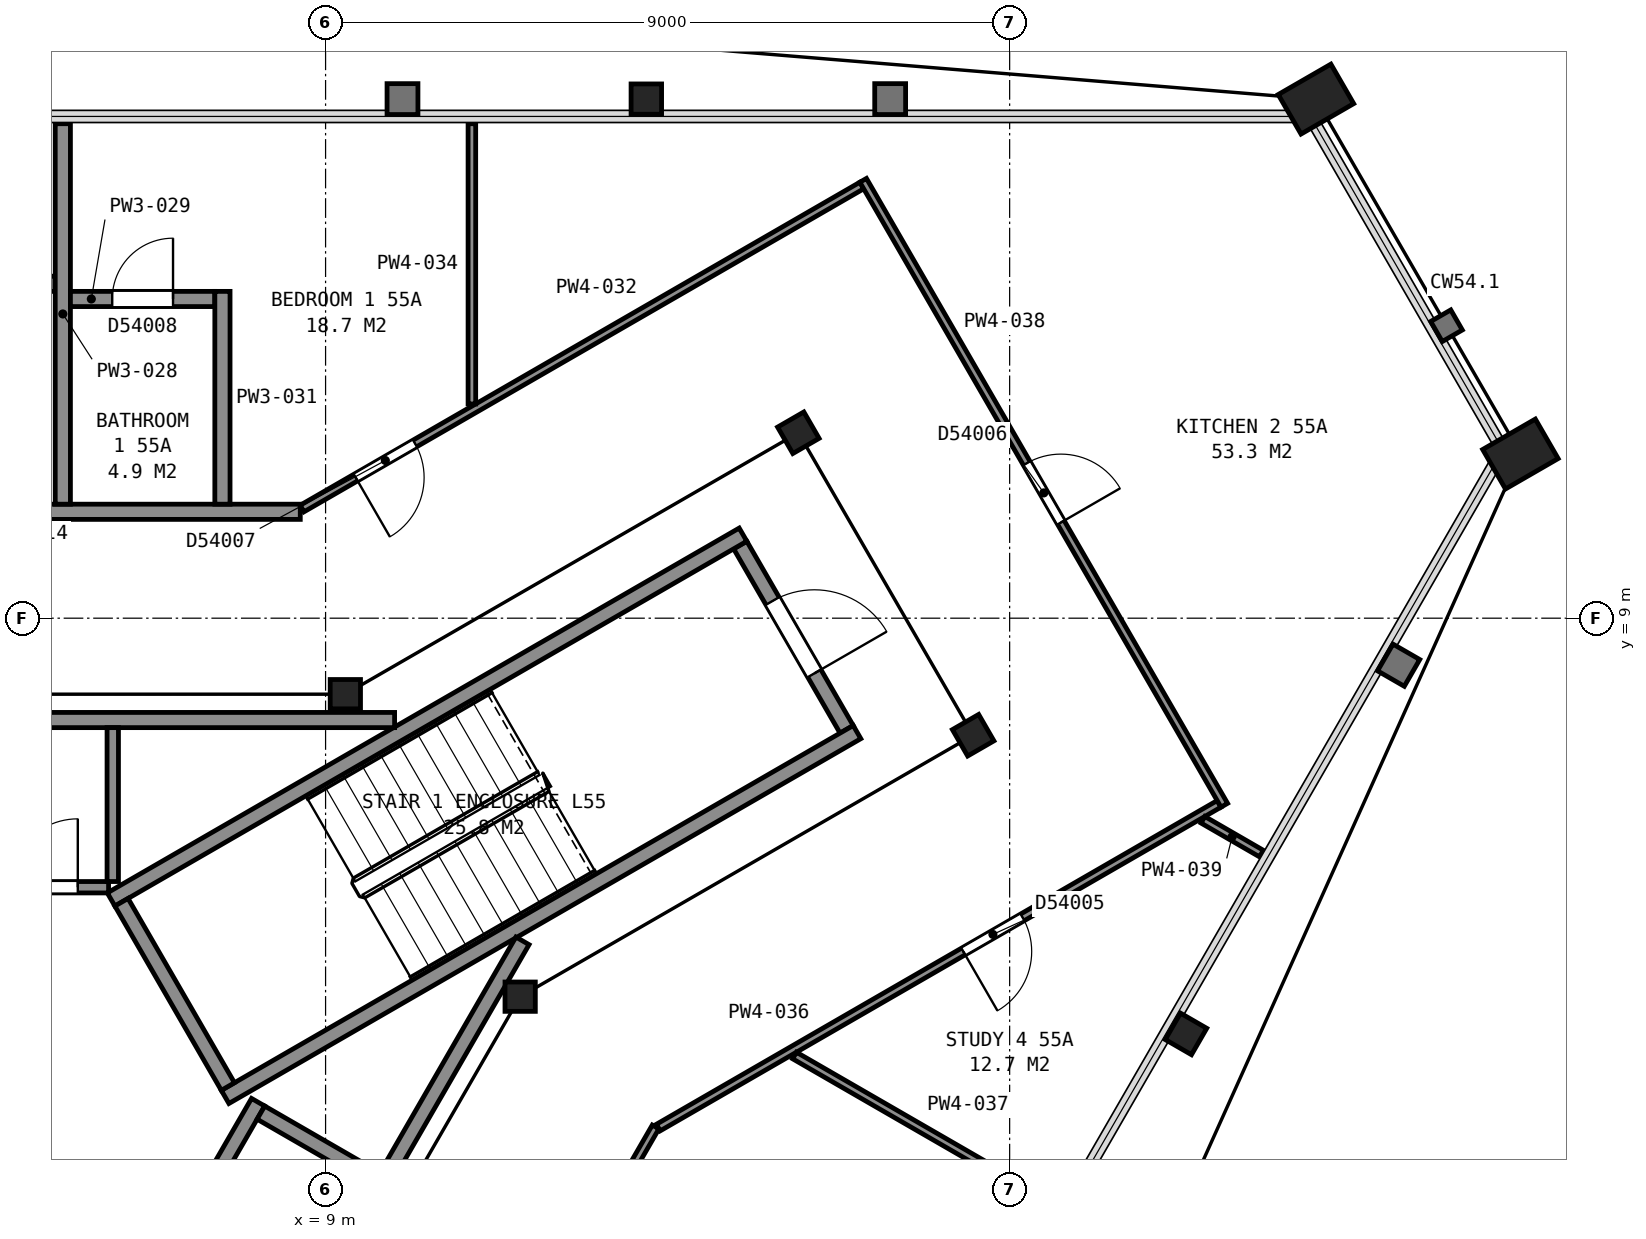
"""IFC4 building model, lengths in metres.
Left out: names, types, materials, properties, quantities, classifications, styles, units other than length and angle.
Written with IfcOpenShell. Run it as: python <this file> out.ifc"""

import sys

from ifc_helpers import new_model, si_unit, direction, frame, frame_2d, origin, origin_2d, place, context, subcontext, project, spatial, rectangle, hollow_rectangle, i_section, extrude, element, fill, save


model = new_model("IFC4")
c1 = context("Model", 3, precision=1e-05, world=origin(), true_north=direction((0.0, 1.0)))
c2 = subcontext(c1, "Body", "Model", "MODEL_VIEW")
j1 = project(units=[si_unit("LENGTHUNIT", "METRE"), si_unit("PLANEANGLEUNIT", "RADIAN")], contexts=[c1])
p1 = place(None, origin())
s1 = spatial("IfcSite", under=j1, at=p1, CompositionType="ELEMENT")
p2 = place(p1, origin())
s2 = spatial("IfcBuilding", under=s1, at=p2, CompositionType="ELEMENT")
p3 = place(p2, frame((0.0, 0.0, 221.2)))
s3 = spatial("IfcBuildingStorey", under=s2, at=p3, CompositionType="ELEMENT", Elevation=221.2)
p4 = place(p3, frame((22.03, 15.83, 0.0), z_axis=(0.0, 0.0, 1.0), x_axis=(0.5, -0.866025403784, 0.0)))
e1 = element("IfcColumn", 1, at=p4, inside=s3, PredefinedType="COLUMN", context=c2, shape_type="SweptSolid", body=[
    extrude(hollow_rectangle(XDim=0.6, YDim=0.8, WallThickness=0.05, at=origin_2d()), origin(), (0.0, 0.0, 1.0), 3.7),
])
for number, where, z_axis, x_axis in (
    (2, (13.22, 15.83, 0.0), (0.0, 0.0, 1.0), (1.0, 0.0, 0.0)),
    (3, (20.32, 3.53, 0.0), (0.0, 0.0, 1.0), (-0.5, -0.866, 0.0)),
):
    element("IfcColumn", number, at=place(p3, frame(where, z_axis=z_axis, x_axis=x_axis)), inside=s3, PredefinedType="COLUMN", context=c2, shape_type="SweptSolid", body=[
        extrude(i_section(OverallWidth=0.401, OverallDepth=0.399, WebThickness=0.025, FlangeThickness=0.04, FilletRadius=0.015, at=origin_2d()), origin(), (0.0, 0.0, 1.0), 3.7),
    ])
p5 = place(p3, frame((24.72, 11.16, 0.0), z_axis=(0.0, 0.0, 1.0), x_axis=(0.5, -0.866025403784, 0.0)))
e4 = element("IfcColumn", 4, at=p5, inside=s3, PredefinedType="COLUMN", context=c2, shape_type="SweptSolid", body=[
    extrude(hollow_rectangle(XDim=0.6, YDim=0.8, WallThickness=0.05, at=origin_2d()), origin(), (0.0, 0.0, 1.0), 3.7),
])
p6 = place(p3, frame((11.56, 4.02, 0.0), z_axis=(0.0, 0.0, 1.0), x_axis=(1.0, 0.0, 0.0)))
e5 = element("IfcColumn", 5, at=p6, inside=s3, PredefinedType="COLUMN", context=c2, shape_type="SweptSolid", body=[
    extrude(i_section(OverallWidth=0.399, OverallDepth=0.386, WebThickness=0.021, FlangeThickness=0.033, FilletRadius=0.015, at=origin_2d()), origin(), (0.0, 0.0, 1.0), 3.7),
])
for number, where, z_axis, x_axis in (
    (6, (17.52, 7.46, 0.0), (0.0, 0.0, 1.0), (0.5, -0.866, 0.0)),
    (7, (15.22, 11.44, 0.0), (0.0, 0.0, 1.0), (0.5, -0.866, 0.0)),
):
    element("IfcColumn", number, at=place(p3, frame(where, z_axis=z_axis, x_axis=x_axis)), inside=s3, PredefinedType="COLUMN", context=c2, shape_type="SweptSolid", body=[
        extrude(i_section(OverallWidth=0.401, OverallDepth=0.399, WebThickness=0.025, FlangeThickness=0.04, FilletRadius=0.015, at=origin_2d()), origin(), (0.0, 0.0, 1.0), 3.7),
    ])
p7 = place(p3, frame((9.26, 8.0, 0.0), z_axis=(0.0, 0.0, 1.0), x_axis=(1.0, 0.0, 0.0)))
e8 = element("IfcColumn", 8, at=p7, inside=s3, PredefinedType="COLUMN", context=c2, shape_type="SweptSolid", body=[
    extrude(i_section(OverallWidth=0.399, OverallDepth=0.386, WebThickness=0.021, FlangeThickness=0.033, FilletRadius=0.015, at=origin_2d()), origin(), (0.0, 0.0, 1.0), 3.7),
])
p8 = place(p3, frame((15.855, 7.538, 0.0), z_axis=(0.0, 0.0, 1.0), x_axis=(-0.500049511043, 0.865996816683, 0.0)))
e9 = element("IfcWall", 9, at=p8, inside=s3, PredefinedType="PARTITIONING", context=c2, shape_type="SweptSolid", body=[
    extrude(rectangle(XDim=2.8, YDim=0.2, at=frame_2d((1.4, 0.0))), origin(), (0.0, 0.0, 1.0), 3.45),
])
p9 = place(p8, frame((0.85, 0.0, 0.0)))
e10 = element("IfcOpeningElement", 10, at=p9, cuts=e9, PredefinedType="OPENING", context=c2, shape_type="SweptSolid", body=[
    extrude(rectangle(XDim=1.1, YDim=2.1, at=frame_2d((0.55, 1.05))), frame((0.0, 0.11, 0.0), z_axis=(0.0, -1.0, 0.0), x_axis=(1.0, 0.0, 0.0)), (0.0, 0.0, 1.0), 0.22),
])
for number, where, z_axis, x_axis in (
    (11, (6.178, 5.299, 0.0), (0.0, 0.0, 1.0), (0.866, 0.5, 0.0)),
    (12, (7.678, 2.701, 0.0), (0.0, 0.0, 1.0), (0.866, 0.5, 0.0)),
):
    element("IfcWall", number, at=place(p3, frame(where, z_axis=z_axis, x_axis=x_axis)), inside=s3, PredefinedType="PARTITIONING", context=c2, shape_type="SweptSolid", body=[
        extrude(rectangle(XDim=9.6, YDim=0.2, at=frame_2d((4.8, 0.0))), origin(), (0.0, 0.0, 1.0), 3.45),
    ])
p10 = place(p3, frame((7.715, 2.838, 0.0), z_axis=(0.0, 0.0, 1.0), x_axis=(-0.500049511043, 0.865996816683, 0.0)))
e13 = element("IfcWall", 13, at=p10, inside=s3, PredefinedType="PARTITIONING", context=c2, shape_type="SweptSolid", body=[
    extrude(rectangle(XDim=2.8, YDim=0.2, at=frame_2d((1.4, 0.0))), origin(), (0.0, 0.0, 1.0), 3.45),
])
p11 = place(p3, frame((5.663, -1.612, 0.0), z_axis=(0.0, 0.0, 1.0), x_axis=(0.49998122708, 0.866036242063, 0.0)))
e14 = element("IfcWall", 14, at=p11, inside=s3, PredefinedType="PARTITIONING", context=c2, shape_type="SweptSolid", body=[
    extrude(rectangle(XDim=4.9, YDim=0.2, at=frame_2d((2.45, 0.0))), origin(), (0.0, 0.0, 1.0), 3.7),
])
p12 = place(p3, frame((9.665, 1.62, 0.0), z_axis=(0.0, 0.0, 1.0), x_axis=(-0.866002029911, 0.500040482552, 0.0)))
e15 = element("IfcWall", 15, at=p12, inside=s3, PredefinedType="PARTITIONING", context=c2, shape_type="SweptSolid", body=[
    extrude(rectangle(XDim=1.75, YDim=0.2, at=frame_2d((0.875, 0.0))), origin(), (0.0, 0.0, 1.0), 3.7),
])
p13 = place(p3, frame((-3.933, 7.66, 0.0), z_axis=(0.0, 0.0, 1.0), x_axis=(1.0, 0.0, 0.0)))
e16 = element("IfcWall", 16, at=p13, inside=s3, PredefinedType="PARTITIONING", context=c2, shape_type="SweptSolid", body=[
    extrude(rectangle(XDim=13.841, YDim=0.2, at=frame_2d((6.92, 0.0))), origin(), (0.0, 0.0, 1.0), 3.45),
])
p14 = place(p3, frame((0.925, 5.46, 0.0), z_axis=(0.0, 0.0, 1.0), x_axis=(1.0, 0.0, 0.0)))
e17 = element("IfcWall", 17, at=p14, inside=s3, PredefinedType="PARTITIONING", context=c2, shape_type="SweptSolid", body=[
    extrude(rectangle(XDim=5.22, YDim=0.15, at=frame_2d((2.61, 0.0))), origin(), (0.0, 0.0, 1.0), 3.45),
])
p15 = place(p14, frame((3.915, 0.0, 0.0)))
e18 = element("IfcOpeningElement", 18, at=p15, cuts=e17, PredefinedType="OPENING", context=c2, shape_type="SweptSolid", body=[
    extrude(rectangle(XDim=0.9, YDim=2.1, at=frame_2d((0.45, 1.05))), frame((0.0, 0.085, 0.0), z_axis=(0.0, -1.0, 0.0), x_axis=(1.0, 0.0, 0.0)), (0.0, 0.0, 1.0), 0.17),
])
p16 = place(p3, frame((6.2, 5.535, 0.0), z_axis=(0.0, 0.0, 1.0), x_axis=(0.0, 1.0, 0.0)))
e19 = element("IfcWall", 19, at=p16, inside=s3, PredefinedType="PARTITIONING", context=c2, shape_type="SweptSolid", body=[
    extrude(rectangle(XDim=2.025, YDim=0.15, at=frame_2d((1.013, 0.0))), origin(), (0.0, 0.0, 1.0), 3.45),
])
p17 = place(p3, frame((9.803, 1.658, 0.0), z_axis=(0.0, 0.0, 1.0), x_axis=(0.499943114462, 0.866058244174, 0.0)))
e20 = element("IfcWall", 20, at=p17, inside=s3, PredefinedType="PARTITIONING", context=c2, shape_type="SweptSolid", body=[
    extrude(rectangle(XDim=3.576, YDim=0.2, at=frame_2d((1.788, 0.0))), origin(), (0.0, 0.0, 1.0), 3.45),
])
p18 = place(p3, frame((-8.667, 10.4, 0.0), z_axis=(0.0, 0.0, 1.0), x_axis=(1.0, 0.0, 0.0)))
e21 = element("IfcWall", 21, at=p18, inside=s3, PredefinedType="PARTITIONING", context=c2, shape_type="SweptSolid", body=[
    extrude(rectangle(XDim=17.334, YDim=0.2, at=frame_2d((8.667, 0.0))), origin(), (0.0, 0.0, 1.0), 2.713),
])
p19 = place(p18, frame((9.252, 0.0, 0.0)))
e22 = element("IfcOpeningElement", 22, at=p19, cuts=e21, PredefinedType="OPENING", context=c2, shape_type="SweptSolid", body=[
    extrude(rectangle(XDim=0.9, YDim=2.1, at=frame_2d((0.45, 1.05))), frame((0.0, 0.11, 0.0), z_axis=(0.0, -1.0, 0.0), x_axis=(1.0, 0.0, 0.0)), (0.0, 0.0, 1.0), 0.22),
])
p20 = place(p18, frame((4.851, 0.0, 0.0)))
e23 = element("IfcOpeningElement", 23, at=p20, cuts=e21, PredefinedType="OPENING", context=c2, shape_type="SweptSolid", body=[
    extrude(rectangle(XDim=0.9, YDim=2.1, at=frame_2d((0.45, 1.05))), frame((0.0, 0.11, 0.0), z_axis=(0.0, -1.0, 0.0), x_axis=(1.0, 0.0, 0.0)), (0.0, 0.0, 1.0), 0.22),
])
p21 = place(p3, frame((3.043, 13.4, 0.0), z_axis=(0.0, 0.0, 1.0), x_axis=(1.0, 0.0, 0.0)))
e24 = element("IfcWall", 24, at=p21, inside=s3, PredefinedType="PARTITIONING", context=c2, shape_type="SweptSolid", body=[
    extrude(rectangle(XDim=2.4, YDim=0.2, at=frame_2d((1.2, 0.0))), origin(), (0.0, 0.0, 1.0), 2.713),
])
p22 = place(p3, frame((13.342, 2.306, 0.0), z_axis=(0.0, 0.0, 1.0), x_axis=(-0.49997440863, -0.866040178465, 0.0)))
e25 = element("IfcWall", 25, at=p22, inside=s3, PredefinedType="PARTITIONING", context=c2, shape_type="SweptSolid", body=[
    extrude(rectangle(XDim=17.335, YDim=0.1, at=frame_2d((8.667, 0.0))), origin(), (0.0, 0.0, 1.0), 2.713),
])
p23 = place(p22, frame((14.935, 0.0, 0.0)))
e26 = element("IfcOpeningElement", 26, at=p23, cuts=e25, PredefinedType="OPENING", context=c2, shape_type="SweptSolid", body=[
    extrude(rectangle(XDim=0.9, YDim=2.1, at=frame_2d((0.45, 1.05))), frame((0.0, 0.06, 0.0), z_axis=(0.0, -1.0, 0.0), x_axis=(1.0, 0.0, 0.0)), (0.0, 0.0, 1.0), 0.12),
])
p24 = place(p22, frame((10.794, 0.0, 0.0)))
e27 = element("IfcOpeningElement", 27, at=p24, cuts=e25, PredefinedType="OPENING", context=c2, shape_type="SweptSolid", body=[
    extrude(rectangle(XDim=0.9, YDim=2.1, at=frame_2d((0.45, 1.05))), frame((0.0, 0.06, 0.0), z_axis=(0.0, -1.0, 0.0), x_axis=(1.0, 0.0, 0.0)), (0.0, 0.0, 1.0), 0.12),
])
p25 = place(p22, frame((5.866, 0.0, 0.0)))
e28 = element("IfcOpeningElement", 28, at=p25, cuts=e25, PredefinedType="OPENING", context=c2, shape_type="SweptSolid", body=[
    extrude(rectangle(XDim=0.9, YDim=2.1, at=frame_2d((0.45, 1.05))), frame((0.0, 0.06, 0.0), z_axis=(0.0, -1.0, 0.0), x_axis=(1.0, 0.0, 0.0)), (0.0, 0.0, 1.0), 0.12),
])
p26 = place(p22, frame((1.395, 0.0, 0.0)))
e29 = element("IfcOpeningElement", 29, at=p26, cuts=e25, PredefinedType="OPENING", context=c2, shape_type="SweptSolid", body=[
    extrude(rectangle(XDim=0.9, YDim=2.1, at=frame_2d((0.45, 1.05))), frame((0.0, 0.06, 0.0), z_axis=(0.0, -1.0, 0.0), x_axis=(1.0, 0.0, 0.0)), (0.0, 0.0, 1.0), 0.12),
])
p27 = place(p3, frame((5.543, 10.5, 0.0), z_axis=(0.0, 0.0, 1.0), x_axis=(0.0, 1.0, 0.0)))
e30 = element("IfcWall", 30, at=p27, inside=s3, PredefinedType="PARTITIONING", context=c2, shape_type="SweptSolid", body=[
    extrude(rectangle(XDim=5.006, YDim=0.2, at=frame_2d((2.503, 0.0))), origin(), (0.0, 0.0, 1.0), 2.713),
])
p28 = place(p3, frame((7.543, 13.2, 0.0), z_axis=(0.0, 0.0, 1.0), x_axis=(-1.0, 0.0, 0.0)))
e31 = element("IfcWall", 31, at=p28, inside=s3, PredefinedType="PARTITIONING", context=c2, shape_type="SweptSolid", body=[
    extrude(rectangle(XDim=1.9, YDim=0.2, at=frame_2d((0.95, 0.0))), origin(), (0.0, 0.0, 1.0), 2.713),
])
p29 = place(p28, frame((0.55, 0.0, 0.0)))
e32 = element("IfcOpeningElement", 32, at=p29, cuts=e31, PredefinedType="OPENING", context=c2, shape_type="SweptSolid", body=[
    extrude(rectangle(XDim=0.8, YDim=2.1, at=frame_2d((0.4, 1.05))), frame((0.0, 0.11, 0.0), z_axis=(0.0, -1.0, 0.0), x_axis=(1.0, 0.0, 0.0)), (0.0, 0.0, 1.0), 0.22),
])
p30 = place(p3, frame((7.643, 10.5, 0.0), z_axis=(0.0, 0.0, 1.0), x_axis=(0.0, 1.0, 0.0)))
e33 = element("IfcWall", 33, at=p30, inside=s3, PredefinedType="PARTITIONING", context=c2, shape_type="SweptSolid", body=[
    extrude(rectangle(XDim=2.8, YDim=0.2, at=frame_2d((1.4, 0.0))), origin(), (0.0, 0.0, 1.0), 2.713),
])
p31 = place(p3, frame((8.691, 10.442, 0.0), z_axis=(0.0, 0.0, 1.0), x_axis=(0.866070360466, 0.499922124658, 0.0)))
e34 = element("IfcWall", 34, at=p31, inside=s3, PredefinedType="PARTITIONING", context=c2, shape_type="SweptSolid", body=[
    extrude(rectangle(XDim=8.503, YDim=0.1, at=frame_2d((4.251, 0.0))), origin(), (0.0, 0.0, 1.0), 2.713),
])
p32 = place(p31, frame((0.815, 0.0, 0.0)))
e35 = element("IfcOpeningElement", 35, at=p32, cuts=e34, PredefinedType="OPENING", context=c2, shape_type="SweptSolid", body=[
    extrude(rectangle(XDim=0.9, YDim=2.1, at=frame_2d((0.45, 1.05))), frame((0.0, 0.06, 0.0), z_axis=(0.0, -1.0, 0.0), x_axis=(1.0, 0.0, 0.0)), (0.0, 0.0, 1.0), 0.12),
])
p33 = place(p3, frame((10.925, 11.819, 0.0), z_axis=(0.0, 0.0, 1.0), x_axis=(0.0, 1.0, 0.0)))
e36 = element("IfcWall", 36, at=p33, inside=s3, PredefinedType="PARTITIONING", context=c2, shape_type="SweptSolid", body=[
    extrude(rectangle(XDim=3.688, YDim=0.1, at=frame_2d((1.844, 0.0))), origin(), (0.0, 0.0, 1.0), 2.713),
])
p34 = place(p3, frame((20.756, 6.557, 0.0), z_axis=(0.0, 0.0, 1.0), x_axis=(-0.866069146081, -0.499924228466, 0.0)))
e37 = element("IfcWall", 37, at=p34, inside=s3, PredefinedType="PARTITIONING", context=c2, shape_type="SweptSolid", body=[
    extrude(rectangle(XDim=8.519, YDim=0.1, at=frame_2d((4.259, 0.0))), origin(), (0.0, 0.0, 1.0), 2.713),
])
p35 = place(p34, frame((2.986, 0.0, 0.0)))
e38 = element("IfcOpeningElement", 38, at=p35, cuts=e37, PredefinedType="OPENING", context=c2, shape_type="SweptSolid", body=[
    extrude(rectangle(XDim=0.9, YDim=2.1, at=frame_2d((0.45, 1.05))), frame((0.0, 0.06, 0.0), z_axis=(0.0, -1.0, 0.0), x_axis=(1.0, 0.0, 0.0)), (0.0, 0.0, 1.0), 0.12),
])
p36 = place(p3, frame((15.17, 3.246, 0.0), z_axis=(0.0, 0.0, 1.0), x_axis=(0.866149939141, -0.499784236372, 0.0)))
e39 = element("IfcWall", 39, at=p36, inside=s3, PredefinedType="PARTITIONING", context=c2, shape_type="SweptSolid", body=[
    extrude(rectangle(XDim=3.991, YDim=0.1, at=frame_2d((1.996, 0.0))), origin(), (0.0, 0.0, 1.0), 2.713),
])
p37 = place(p3, frame((16.073, 14.761, 0.0), z_axis=(0.0, 0.0, 1.0), x_axis=(0.500297300687, -0.865853689098, 0.0)))
e40 = element("IfcWall", 40, at=p37, inside=s3, PredefinedType="PARTITIONING", context=c2, shape_type="SweptSolid", body=[
    extrude(rectangle(XDim=9.496, YDim=0.1, at=frame_2d((4.748, 0.0))), origin(), (0.0, 0.0, 1.0), 2.713),
])
p38 = place(p37, frame((4.3, 0.0, 0.0)))
e41 = element("IfcOpeningElement", 41, at=p38, cuts=e40, PredefinedType="OPENING", context=c2, shape_type="SweptSolid", body=[
    extrude(rectangle(XDim=0.9, YDim=2.1, at=frame_2d((0.45, 1.05))), frame((0.0, 0.06, 0.0), z_axis=(0.0, -1.0, 0.0), x_axis=(1.0, 0.0, 0.0)), (0.0, 0.0, 1.0), 0.12),
])
p39 = place(p3, frame((20.543, 6.348, 0.0), z_axis=(0.0, 0.0, 1.0), x_axis=(0.865952303503, -0.500126592033, 0.0)))
e42 = element("IfcWall", 42, at=p39, inside=s3, PredefinedType="PARTITIONING", context=c2, shape_type="SweptSolid", body=[
    extrude(rectangle(XDim=0.889, YDim=0.1, at=frame_2d((0.444, 0.0))), origin(), (0.0, 0.0, 1.0), 2.713),
])
p40 = place(p9, origin())
e43 = element("IfcDoor", 43, at=p40, inside=s3, OperationType="SINGLE_SWING_LEFT", PredefinedType="DOOR", context=c2, shape_type="SweptSolid", body=[
    extrude(rectangle(XDim=1.1, YDim=2.1, at=frame_2d((0.55, 1.05))), frame((0.0, 0.025, 0.0), z_axis=(0.0, -1.0, 0.0), x_axis=(1.0, 0.0, 0.0)), (0.0, 0.0, 1.0), 0.05),
])
fill(e10, e43)
p41 = place(p15, origin())
e44 = element("IfcDoor", 44, at=p41, inside=s3, OperationType="SINGLE_SWING_RIGHT", PredefinedType="DOOR", context=c2, shape_type="SweptSolid", body=[
    extrude(rectangle(XDim=0.9, YDim=2.1, at=frame_2d((0.45, 1.05))), frame((0.0, 0.025, 0.0), z_axis=(0.0, -1.0, 0.0), x_axis=(1.0, 0.0, 0.0)), (0.0, 0.0, 1.0), 0.05),
])
fill(e18, e44)
p42 = place(p29, origin())
e45 = element("IfcDoor", 45, at=p42, inside=s3, OperationType="SINGLE_SWING_LEFT", PredefinedType="DOOR", context=c2, shape_type="SweptSolid", body=[
    extrude(rectangle(XDim=0.8, YDim=2.1, at=frame_2d((0.4, 1.05))), frame((0.0, 0.025, 0.0), z_axis=(0.0, -1.0, 0.0), x_axis=(1.0, 0.0, 0.0)), (0.0, 0.0, 1.0), 0.05),
])
fill(e32, e45)
p43 = place(p32, origin())
e46 = element("IfcDoor", 46, at=p43, inside=s3, OperationType="SINGLE_SWING_LEFT", PredefinedType="DOOR", context=c2, shape_type="SweptSolid", body=[
    extrude(rectangle(XDim=0.9, YDim=2.1, at=frame_2d((0.45, 1.05))), frame((0.0, 0.025, 0.0), z_axis=(0.0, -1.0, 0.0), x_axis=(1.0, 0.0, 0.0)), (0.0, 0.0, 1.0), 0.05),
])
fill(e35, e46)
p44 = place(p35, origin())
e47 = element("IfcDoor", 47, at=p44, inside=s3, OperationType="SINGLE_SWING_RIGHT", PredefinedType="DOOR", context=c2, shape_type="SweptSolid", body=[
    extrude(rectangle(XDim=0.9, YDim=2.1, at=frame_2d((0.45, 1.05))), frame((0.0, 0.025, 0.0), z_axis=(0.0, -1.0, 0.0), x_axis=(1.0, 0.0, 0.0)), (0.0, 0.0, 1.0), 0.05),
])
fill(e38, e47)
p45 = place(p38, origin())
e48 = element("IfcDoor", 48, at=p45, inside=s3, OperationType="SINGLE_SWING_RIGHT", PredefinedType="DOOR", context=c2, shape_type="SweptSolid", body=[
    extrude(rectangle(XDim=0.9, YDim=2.1, at=frame_2d((0.45, 1.05))), frame((0.0, 0.025, 0.0), z_axis=(0.0, -1.0, 0.0), x_axis=(1.0, 0.0, 0.0)), (0.0, 0.0, 1.0), 0.05),
])
fill(e41, e48)
save(model, sys.argv[1])
